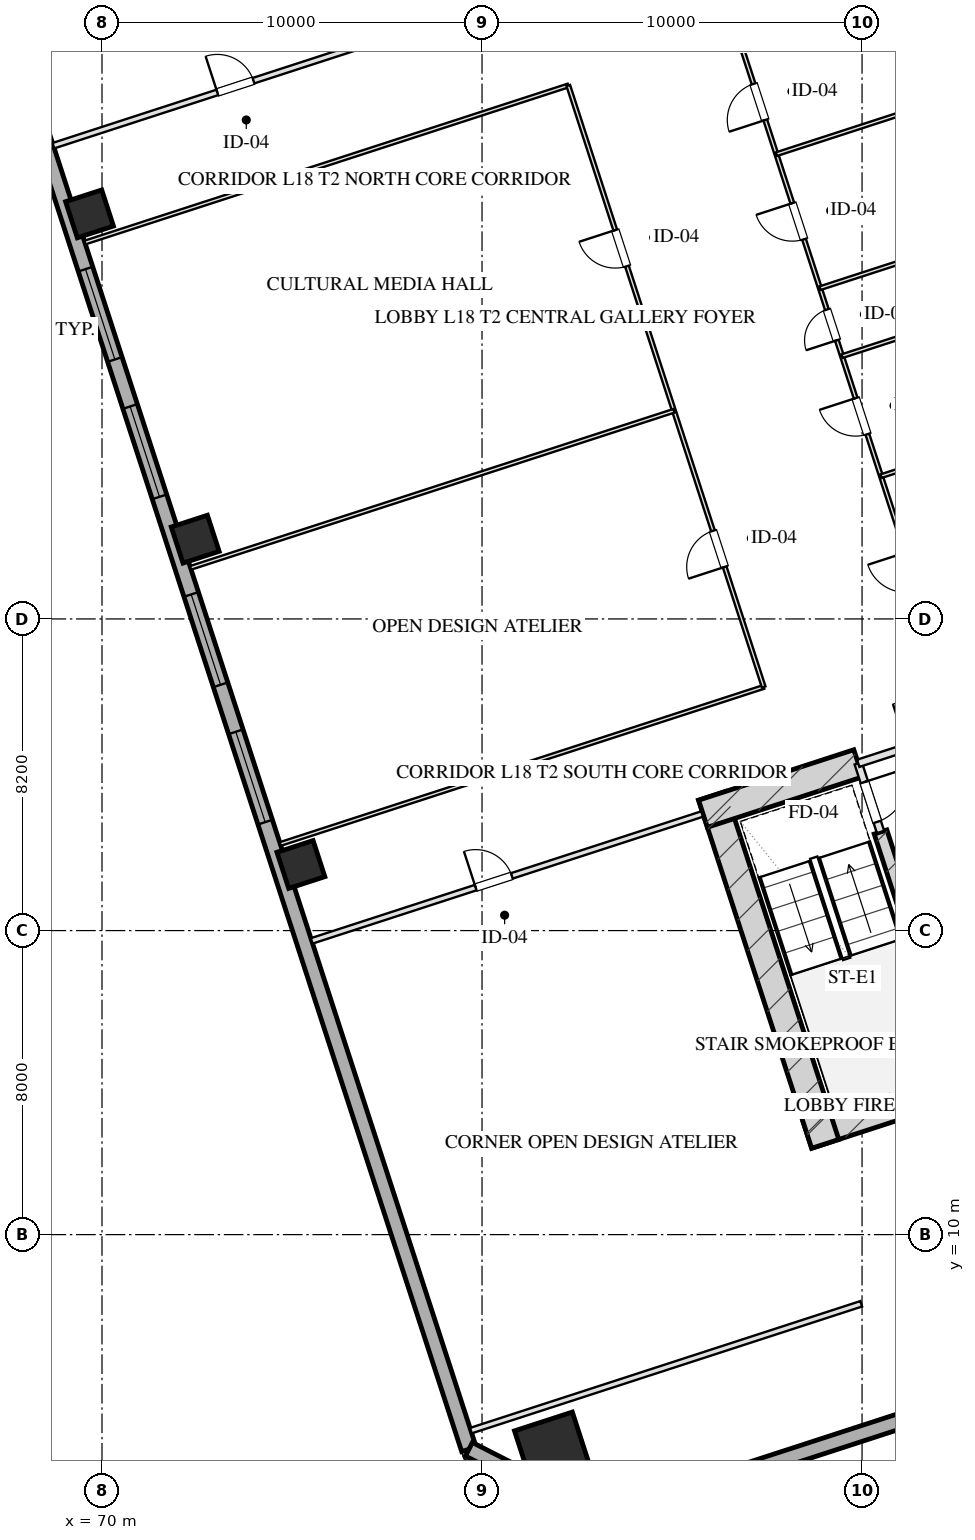
"""IFC4 building model, lengths in metres.
Left out: names, types, materials, properties, quantities, classifications, styles, units other than length and angle.
Written with IfcOpenShell. Run it as: python <this file> out.ifc"""

import sys

from ifc_helpers import new_model, si_unit, direction, frame, frame_2d, origin, origin_2d, place, context, subcontext, project, spatial, rectangle, hollow_rectangle, extrude, element, fill, save


model = new_model("IFC4")
c1 = context("Model", 3, precision=1e-05, world=origin(), true_north=direction((0.0, 1.0)))
c2 = subcontext(c1, "Body", "Model", "MODEL_VIEW")
j1 = project(units=[si_unit("LENGTHUNIT", "METRE"), si_unit("PLANEANGLEUNIT", "RADIAN")], contexts=[c1])
p1 = place(None, origin())
s1 = spatial("IfcSite", under=j1, at=p1, CompositionType="ELEMENT")
p2 = place(p1, origin())
s2 = spatial("IfcBuilding", under=s1, at=p2, CompositionType="ELEMENT")
p3 = place(p2, frame((0.0, 0.0, 74.75)))
s3 = spatial("IfcBuildingStorey", under=s2, at=p3, CompositionType="ELEMENT", Elevation=74.75)
p4 = place(p3, frame((88.559, 12.629, 0.0), z_axis=(0.0, 0.0, 1.0), x_axis=(0.951056072937, 0.309018358888, 0.0)))
e1 = element("IfcWall", 1, at=p4, inside=s3, PredefinedType="SHEAR", context=c2, shape_type="SweptSolid", body=[
    extrude(rectangle(XDim=16.55, YDim=0.75, at=frame_2d((8.275, 0.0))), origin(), (0.0, 0.0, 1.0), 3.45),
])
p5 = place(p3, frame((86.055, 21.546, 0.0), z_axis=(0.0, 0.0, 1.0), x_axis=(0.309023585745, -0.951054374604, 0.0)))
e2 = element("IfcWall", 2, at=p5, inside=s3, PredefinedType="SHEAR", context=c2, shape_type="SweptSolid", body=[
    extrude(rectangle(XDim=9.63, YDim=0.75, at=frame_2d((4.815, 0.0))), origin(), (0.0, 0.0, 1.0), 3.45),
])
p6 = place(p3, frame((90.486, 20.594, 0.0), z_axis=(0.0, 0.0, 1.0), x_axis=(0.309020428229, -0.951055400562, 0.0)))
e3 = element("IfcWall", 3, at=p6, inside=s3, PredefinedType="SHEAR", context=c2, shape_type="SweptSolid", body=[
    extrude(rectangle(XDim=6.98, YDim=0.35, at=frame_2d((3.49, 0.0))), origin(), (0.0, 0.0, 1.0), 3.45),
])
p7 = place(p3, frame((85.814, 21.074, 0.0), z_axis=(0.0, 0.0, 1.0), x_axis=(0.95106580992, 0.308988390074, 0.0)))
e4 = element("IfcWall", 4, at=p7, inside=s3, PredefinedType="SHEAR", context=c2, shape_type="SweptSolid", body=[
    extrude(rectangle(XDim=4.295, YDim=0.75, at=frame_2d((2.147, 0.0))), origin(), (0.0, 0.0, 1.0), 3.45),
])
p8 = place(p3, frame((81.863, 4.323, 0.0), z_axis=(0.0, 0.0, 1.0), x_axis=(0.951056516295, 0.309016994375, 0.0)))
e5 = element("IfcColumn", 5, at=p8, inside=s3, PredefinedType="COLUMN", context=c2, shape_type="SweptSolid", body=[
    extrude(hollow_rectangle(XDim=1.6, YDim=1.6, WallThickness=0.055, at=origin_2d()), origin(), (0.0, 0.0, 1.0), 3.451),
])
for number, where, z_axis, x_axis in (
    (6, (75.234, 19.739, 0.0), (0.0, 0.0, 1.0), (0.951, 0.309, 0.0)),
    (7, (72.453, 28.299, 0.0), (0.0, 0.0, 1.0), (0.951, 0.309, 0.0)),
    (8, (69.672, 36.858, 0.0), (0.0, 0.0, 1.0), (0.951, 0.309, 0.0)),
):
    element("IfcColumn", number, at=place(p3, frame(where, z_axis=z_axis, x_axis=x_axis)), inside=s3, PredefinedType="COLUMN", context=c2, shape_type="SweptSolid", body=[
        extrude(hollow_rectangle(XDim=1.0, YDim=1.0, WallThickness=0.036, at=origin_2d()), origin(), (0.0, 0.0, 1.0), 3.451),
    ])
p9 = place(p3, frame((79.655, 4.352, 0.0), z_axis=(0.0, 0.0, 1.0), x_axis=(-0.309014526607, 0.951057318118, 0.0)))
e9 = element("IfcWall", 9, at=p9, inside=s3, PredefinedType="SOLIDWALL", context=c2, shape_type="SweptSolid", body=[
    extrude(rectangle(XDim=50.0, YDim=0.4, at=frame_2d((25.0, 0.0))), origin(), (0.0, 0.0, 1.0), 2.61),
])
p10 = place(p9, frame((17.35, 0.0, 0.75)))
e10 = element("IfcOpeningElement", 10, at=p10, cuts=e9, PredefinedType="OPENING", context=c2, shape_type="SweptSolid", body=[
    extrude(rectangle(XDim=2.5, YDim=1.46, at=frame_2d((1.25, 0.73))), frame((0.0, 0.21, 0.0), z_axis=(0.0, -1.0, 0.0), x_axis=(1.0, 0.0, 0.0)), (0.0, 0.0, 1.0), 0.42),
])
p11 = place(p9, frame((21.15, 0.0, 0.75)))
e11 = element("IfcOpeningElement", 11, at=p11, cuts=e9, PredefinedType="OPENING", context=c2, shape_type="SweptSolid", body=[
    extrude(rectangle(XDim=2.5, YDim=1.46, at=frame_2d((1.25, 0.73))), frame((0.0, 0.21, 0.0), z_axis=(0.0, -1.0, 0.0), x_axis=(1.0, 0.0, 0.0)), (0.0, 0.0, 1.0), 0.42),
])
p12 = place(p9, frame((26.35, 0.0, 0.75)))
e12 = element("IfcOpeningElement", 12, at=p12, cuts=e9, PredefinedType="OPENING", context=c2, shape_type="SweptSolid", body=[
    extrude(rectangle(XDim=2.5, YDim=1.46, at=frame_2d((1.25, 0.73))), frame((0.0, 0.21, 0.0), z_axis=(0.0, -1.0, 0.0), x_axis=(1.0, 0.0, 0.0)), (0.0, 0.0, 1.0), 0.42),
])
p13 = place(p9, frame((30.15, 0.0, 0.75)))
e13 = element("IfcOpeningElement", 13, at=p13, cuts=e9, PredefinedType="OPENING", context=c2, shape_type="SweptSolid", body=[
    extrude(rectangle(XDim=2.5, YDim=1.46, at=frame_2d((1.25, 0.73))), frame((0.0, 0.21, 0.0), z_axis=(0.0, -1.0, 0.0), x_axis=(1.0, 0.0, 0.0)), (0.0, 0.0, 1.0), 0.42),
])
p14 = place(p3, frame((113.998, 12.567, 0.0), z_axis=(0.0, 0.0, 1.0), x_axis=(-0.951055939317, -0.309018770125, 0.0)))
e14 = element("IfcWall", 14, at=p14, inside=s3, PredefinedType="SOLIDWALL", context=c2, shape_type="SweptSolid", body=[
    extrude(rectangle(XDim=32.4, YDim=0.4, at=frame_2d((16.2, 0.0))), origin(), (0.0, 0.0, 1.0), 2.61),
])
p15 = place(p3, frame((83.184, 2.554, 0.0), z_axis=(0.0, 0.0, 1.0), x_axis=(-0.890998089617, 0.454007053137, 0.0)))
e15 = element("IfcWall", 15, at=p15, inside=s3, PredefinedType="SOLIDWALL", context=c2, shape_type="SweptSolid", body=[
    extrude(rectangle(XDim=3.96, YDim=0.4, at=frame_2d((1.98, 0.0))), origin(), (0.0, 0.0, 1.0), 2.61),
])
p16 = place(p3, frame((89.899, 22.401, 0.0), z_axis=(0.0, 0.0, 1.0), x_axis=(0.308932062672, -0.951084108086, 0.0)))
e16 = element("IfcWall", 16, at=p16, inside=s3, PredefinedType="PARTITIONING", context=c2, shape_type="SweptSolid", body=[
    extrude(rectangle(XDim=1.9, YDim=0.2, at=frame_2d((0.95, 0.0))), origin(), (0.0, 0.0, 1.0), 3.175),
])
p17 = place(p16, frame((0.52, 0.0, 0.0)))
e17 = element("IfcOpeningElement", 17, at=p17, cuts=e16, PredefinedType="OPENING", context=c2, shape_type="SweptSolid", body=[
    extrude(rectangle(XDim=1.1, YDim=2.05, at=frame_2d((0.55, 1.025))), frame((0.0, 0.11, 0.0), z_axis=(0.0, -1.0, 0.0), x_axis=(1.0, 0.0, 0.0)), (0.0, 0.0, 1.0), 0.22),
])
p18 = place(p3, frame((89.899, 22.401, 0.0), z_axis=(0.0, 0.0, 1.0), x_axis=(0.951046716504, 0.309047153403, 0.0)))
e18 = element("IfcWall", 18, at=p18, inside=s3, PredefinedType="PARTITIONING", context=c2, shape_type="SweptSolid", body=[
    extrude(rectangle(XDim=3.83, YDim=0.2, at=frame_2d((1.915, 0.0))), origin(), (0.0, 0.0, 1.0), 3.175),
])
p19 = place(p18, frame((1.35, 0.0, 0.0)))
e19 = element("IfcOpeningElement", 19, at=p19, cuts=e18, PredefinedType="OPENING", context=c2, shape_type="SweptSolid", body=[
    extrude(rectangle(XDim=1.2, YDim=2.05, at=frame_2d((0.6, 1.025))), frame((0.0, 0.11, 0.0), z_axis=(0.0, -1.0, 0.0), x_axis=(1.0, 0.0, 0.0)), (0.0, 0.0, 1.0), 0.22),
])
p20 = place(p3, frame((79.707, 4.842, 0.0), z_axis=(0.0, 0.0, 1.0), x_axis=(0.951056658866, 0.309016555588, 0.0)))
e20 = element("IfcWall", 20, at=p20, inside=s3, PredefinedType="PARTITIONING", context=c2, shape_type="SweptSolid", body=[
    extrude(rectangle(XDim=10.8, YDim=0.15, at=frame_2d((5.4, 0.0))), origin(), (0.0, 0.0, 1.0), 3.175),
])
p21 = place(p3, frame((75.519, 17.729, 0.0), z_axis=(0.0, 0.0, 1.0), x_axis=(0.951056658866, 0.309016555588, 0.0)))
e21 = element("IfcWall", 21, at=p21, inside=s3, PredefinedType="PARTITIONING", context=c2, shape_type="SweptSolid", body=[
    extrude(rectangle(XDim=10.8, YDim=0.15, at=frame_2d((5.4, 0.0))), origin(), (0.0, 0.0, 1.0), 2.15),
])
p22 = place(p21, frame((4.536, 0.0, 0.0)))
e22 = element("IfcOpeningElement", 22, at=p22, cuts=e21, PredefinedType="OPENING", context=c2, shape_type="SweptSolid", body=[
    extrude(rectangle(XDim=1.0, YDim=2.05, at=frame_2d((0.5, 1.025))), frame((0.0, 0.085, 0.0), z_axis=(0.0, -1.0, 0.0), x_axis=(1.0, 0.0, 0.0)), (0.0, 0.0, 1.0), 0.17),
])
p23 = place(p3, frame((68.721, 38.652, 0.0), z_axis=(0.0, 0.0, 1.0), x_axis=(0.951056658866, 0.309016555588, 0.0)))
e23 = element("IfcWall", 23, at=p23, inside=s3, PredefinedType="PARTITIONING", context=c2, shape_type="SweptSolid", body=[
    extrude(rectangle(XDim=10.8, YDim=0.15, at=frame_2d((5.4, 0.0))), origin(), (0.0, 0.0, 1.0), 2.15),
])
p24 = place(p23, frame((4.536, 0.0, 0.0)))
e24 = element("IfcOpeningElement", 24, at=p24, cuts=e23, PredefinedType="OPENING", context=c2, shape_type="SweptSolid", body=[
    extrude(rectangle(XDim=1.0, YDim=2.05, at=frame_2d((0.5, 1.025))), frame((0.0, 0.085, 0.0), z_axis=(0.0, -1.0, 0.0), x_axis=(1.0, 0.0, 0.0)), (0.0, 0.0, 1.0), 0.17),
])
p25 = place(p3, frame((74.691, 20.278, 0.0), z_axis=(0.0, 0.0, 1.0), x_axis=(0.951052712421, 0.309028701251, 0.0)))
e25 = element("IfcWall", 25, at=p25, inside=s3, PredefinedType="MOVABLE", context=c2, shape_type="SweptSolid", body=[
    extrude(rectangle(XDim=13.375, YDim=0.1, at=frame_2d((6.688, 0.0))), origin(), (0.0, 0.0, 1.0), 3.175),
])
p26 = place(p3, frame((69.549, 36.103, 0.0), z_axis=(0.0, 0.0, 1.0), x_axis=(0.951058077006, 0.309012190961, 0.0)))
e26 = element("IfcWall", 26, at=p26, inside=s3, PredefinedType="MOVABLE", context=c2, shape_type="SweptSolid", body=[
    extrude(rectangle(XDim=13.375, YDim=0.1, at=frame_2d((6.688, 0.0))), origin(), (0.0, 0.0, 1.0), 3.175),
])
p27 = place(p3, frame((87.412, 24.411, 0.0), z_axis=(0.0, 0.0, 1.0), x_axis=(-0.309022042254, 0.951054876125, 0.0)))
e27 = element("IfcWall", 27, at=p27, inside=s3, PredefinedType="MOVABLE", context=c2, shape_type="SweptSolid", body=[
    extrude(rectangle(XDim=16.64, YDim=0.1, at=frame_2d((8.32, 0.0))), origin(), (0.0, 0.0, 1.0), 3.175),
])
p28 = place(p27, frame((3.32, 0.0, 0.0)))
e28 = element("IfcOpeningElement", 28, at=p28, cuts=e27, PredefinedType="OPENING", context=c2, shape_type="SweptSolid", body=[
    extrude(rectangle(XDim=1.0, YDim=2.05, at=frame_2d((0.5, 1.025))), frame((0.0, 0.06, 0.0), z_axis=(0.0, -1.0, 0.0), x_axis=(1.0, 0.0, 0.0)), (0.0, 0.0, 1.0), 0.12),
])
p29 = place(p27, frame((11.64, 0.0, 0.0)))
e29 = element("IfcOpeningElement", 29, at=p29, cuts=e27, PredefinedType="OPENING", context=c2, shape_type="SweptSolid", body=[
    extrude(rectangle(XDim=1.0, YDim=2.05, at=frame_2d((0.5, 1.025))), frame((0.0, 0.06, 0.0), z_axis=(0.0, -1.0, 0.0), x_axis=(1.0, 0.0, 0.0)), (0.0, 0.0, 1.0), 0.12),
])
p30 = place(p3, frame((91.834, 25.848, 0.0), z_axis=(0.0, 0.0, 1.0), x_axis=(-0.30901773025, 0.951056277195, 0.0)))
e30 = element("IfcWall", 30, at=p30, inside=s3, PredefinedType="MOVABLE", context=c2, shape_type="SweptSolid", body=[
    extrude(rectangle(XDim=16.64, YDim=0.1, at=frame_2d((8.32, 0.0))), origin(), (0.0, 0.0, 1.0), 3.175),
])
p31 = place(p30, frame((1.16, 0.0, 0.0)))
e31 = element("IfcOpeningElement", 31, at=p31, cuts=e30, PredefinedType="OPENING", context=c2, shape_type="SweptSolid", body=[
    extrude(rectangle(XDim=1.05, YDim=2.05, at=frame_2d((0.525, 1.025))), frame((0.0, 0.06, 0.0), z_axis=(0.0, -1.0, 0.0), x_axis=(1.0, 0.0, 0.0)), (0.0, 0.0, 1.0), 0.12),
])
p32 = place(p30, frame((5.48, 0.0, 0.0)))
e32 = element("IfcOpeningElement", 32, at=p32, cuts=e30, PredefinedType="OPENING", context=c2, shape_type="SweptSolid", body=[
    extrude(rectangle(XDim=1.0, YDim=2.05, at=frame_2d((0.5, 1.025))), frame((0.0, 0.06, 0.0), z_axis=(0.0, -1.0, 0.0), x_axis=(1.0, 0.0, 0.0)), (0.0, 0.0, 1.0), 0.12),
])
p33 = place(p30, frame((8.08, 0.0, 0.0)))
e33 = element("IfcOpeningElement", 33, at=p33, cuts=e30, PredefinedType="OPENING", context=c2, shape_type="SweptSolid", body=[
    extrude(rectangle(XDim=0.85, YDim=2.05, at=frame_2d((0.425, 1.025))), frame((0.0, 0.06, 0.0), z_axis=(0.0, -1.0, 0.0), x_axis=(1.0, 0.0, 0.0)), (0.0, 0.0, 1.0), 0.12),
])
p34 = place(p30, frame((10.874, 0.0, 0.0)))
e34 = element("IfcOpeningElement", 34, at=p34, cuts=e30, PredefinedType="OPENING", context=c2, shape_type="SweptSolid", body=[
    extrude(rectangle(XDim=1.0, YDim=2.05, at=frame_2d((0.5, 1.025))), frame((0.0, 0.06, 0.0), z_axis=(0.0, -1.0, 0.0), x_axis=(1.0, 0.0, 0.0)), (0.0, 0.0, 1.0), 0.12),
])
p35 = place(p30, frame((14.174, 0.0, 0.0)))
e35 = element("IfcOpeningElement", 35, at=p35, cuts=e30, PredefinedType="OPENING", context=c2, shape_type="SweptSolid", body=[
    extrude(rectangle(XDim=1.0, YDim=2.05, at=frame_2d((0.5, 1.025))), frame((0.0, 0.06, 0.0), z_axis=(0.0, -1.0, 0.0), x_axis=(1.0, 0.0, 0.0)), (0.0, 0.0, 1.0), 0.12),
])
p36 = place(p3, frame((72.33, 27.544, 0.0), z_axis=(0.0, 0.0, 1.0), x_axis=(0.951056333968, 0.309017555521, 0.0)))
e36 = element("IfcWall", 36, at=p36, inside=s3, PredefinedType="MOVABLE", context=c2, shape_type="SweptSolid", body=[
    extrude(rectangle(XDim=13.375, YDim=0.1, at=frame_2d((6.688, 0.0))), origin(), (0.0, 0.0, 1.0), 3.175),
])
for number, where, z_axis, x_axis in (
    (37, (90.499, 29.956, 0.0), (0.0, 0.0, 1.0), (0.951, 0.309, 0.0)),
    (38, (89.473, 33.114, 0.0), (0.0, 0.0, 1.0), (0.951, 0.309, 0.0)),
    (39, (88.892, 34.902, 0.0), (0.0, 0.0, 1.0), (0.951, 0.309, 0.0)),
    (40, (87.746, 38.429, 0.0), (0.0, 0.0, 1.0), (0.951, 0.309, 0.0)),
):
    element("IfcWall", number, at=place(p3, frame(where, z_axis=z_axis, x_axis=x_axis)), inside=s3, PredefinedType="MOVABLE", context=c2, shape_type="SweptSolid", body=[
        extrude(rectangle(XDim=19.575, YDim=0.1, at=frame_2d((9.788, 0.0))), origin(), (0.0, 0.0, 1.0), 3.175),
    ])
p37 = place(p10, origin())
e41 = element("IfcWindow", 41, at=p37, inside=s3, PartitioningType="TRIPLE_PANEL_VERTICAL", PredefinedType="WINDOW", context=c2, shape_type="SweptSolid", body=[
    extrude(rectangle(XDim=2.5, YDim=1.46, at=frame_2d((1.25, 0.73))), frame((0.0, 0.03, 0.0), z_axis=(0.0, -1.0, 0.0), x_axis=(1.0, 0.0, 0.0)), (0.0, 0.0, 1.0), 0.06),
])
fill(e10, e41)
p38 = place(p11, origin())
e42 = element("IfcWindow", 42, at=p38, inside=s3, PartitioningType="TRIPLE_PANEL_VERTICAL", PredefinedType="WINDOW", context=c2, shape_type="SweptSolid", body=[
    extrude(rectangle(XDim=2.5, YDim=1.46, at=frame_2d((1.25, 0.73))), frame((0.0, 0.03, 0.0), z_axis=(0.0, -1.0, 0.0), x_axis=(1.0, 0.0, 0.0)), (0.0, 0.0, 1.0), 0.06),
])
fill(e11, e42)
p39 = place(p12, origin())
e43 = element("IfcWindow", 43, at=p39, inside=s3, PartitioningType="TRIPLE_PANEL_VERTICAL", PredefinedType="WINDOW", context=c2, shape_type="SweptSolid", body=[
    extrude(rectangle(XDim=2.5, YDim=1.46, at=frame_2d((1.25, 0.73))), frame((0.0, 0.03, 0.0), z_axis=(0.0, -1.0, 0.0), x_axis=(1.0, 0.0, 0.0)), (0.0, 0.0, 1.0), 0.06),
])
fill(e12, e43)
p40 = place(p13, origin())
e44 = element("IfcWindow", 44, at=p40, inside=s3, PartitioningType="TRIPLE_PANEL_VERTICAL", PredefinedType="WINDOW", context=c2, shape_type="SweptSolid", body=[
    extrude(rectangle(XDim=2.5, YDim=1.46, at=frame_2d((1.25, 0.73))), frame((0.0, 0.03, 0.0), z_axis=(0.0, -1.0, 0.0), x_axis=(1.0, 0.0, 0.0)), (0.0, 0.0, 1.0), 0.06),
])
fill(e13, e44)
p41 = place(p17, origin())
e45 = element("IfcDoor", 45, at=p41, inside=s3, OperationType="SINGLE_SWING_LEFT", PredefinedType="DOOR", context=c2, shape_type="SweptSolid", body=[
    extrude(rectangle(XDim=1.1, YDim=2.05, at=frame_2d((0.55, 1.025))), frame((0.0, 0.025, 0.0), z_axis=(0.0, -1.0, 0.0), x_axis=(1.0, 0.0, 0.0)), (0.0, 0.0, 1.0), 0.05),
])
fill(e17, e45)
p42 = place(p22, origin())
e46 = element("IfcDoor", 46, at=p42, inside=s3, OperationType="SINGLE_SWING_LEFT", PredefinedType="DOOR", context=c2, shape_type="SweptSolid", body=[
    extrude(rectangle(XDim=1.0, YDim=2.05, at=frame_2d((0.5, 1.025))), frame((0.0, 0.025, 0.0), z_axis=(0.0, -1.0, 0.0), x_axis=(1.0, 0.0, 0.0)), (0.0, 0.0, 1.0), 0.05),
])
fill(e22, e46)
p43 = place(p24, origin())
e47 = element("IfcDoor", 47, at=p43, inside=s3, OperationType="SINGLE_SWING_LEFT", PredefinedType="DOOR", context=c2, shape_type="SweptSolid", body=[
    extrude(rectangle(XDim=1.0, YDim=2.05, at=frame_2d((0.5, 1.025))), frame((0.0, 0.025, 0.0), z_axis=(0.0, -1.0, 0.0), x_axis=(1.0, 0.0, 0.0)), (0.0, 0.0, 1.0), 0.05),
])
fill(e24, e47)
p44 = place(p28, origin())
e48 = element("IfcDoor", 48, at=p44, inside=s3, OperationType="SINGLE_SWING_LEFT", PredefinedType="DOOR", context=c2, shape_type="SweptSolid", body=[
    extrude(rectangle(XDim=1.0, YDim=2.05, at=frame_2d((0.5, 1.025))), frame((0.0, 0.025, 0.0), z_axis=(0.0, -1.0, 0.0), x_axis=(1.0, 0.0, 0.0)), (0.0, 0.0, 1.0), 0.05),
])
fill(e28, e48)
p45 = place(p29, origin())
e49 = element("IfcDoor", 49, at=p45, inside=s3, OperationType="SINGLE_SWING_RIGHT", PredefinedType="DOOR", context=c2, shape_type="SweptSolid", body=[
    extrude(rectangle(XDim=1.0, YDim=2.05, at=frame_2d((0.5, 1.025))), frame((0.0, 0.025, 0.0), z_axis=(0.0, -1.0, 0.0), x_axis=(1.0, 0.0, 0.0)), (0.0, 0.0, 1.0), 0.05),
])
fill(e29, e49)
p46 = place(p32, origin())
e50 = element("IfcDoor", 50, at=p46, inside=s3, OperationType="SINGLE_SWING_RIGHT", PredefinedType="DOOR", context=c2, shape_type="SweptSolid", body=[
    extrude(rectangle(XDim=1.0, YDim=2.05, at=frame_2d((0.5, 1.025))), frame((0.0, 0.025, 0.0), z_axis=(0.0, -1.0, 0.0), x_axis=(1.0, 0.0, 0.0)), (0.0, 0.0, 1.0), 0.05),
])
fill(e32, e50)
p47 = place(p33, origin())
e51 = element("IfcDoor", 51, at=p47, inside=s3, OperationType="SINGLE_SWING_LEFT", PredefinedType="DOOR", context=c2, shape_type="SweptSolid", body=[
    extrude(rectangle(XDim=0.85, YDim=2.05, at=frame_2d((0.425, 1.025))), frame((0.0, 0.025, 0.0), z_axis=(0.0, -1.0, 0.0), x_axis=(1.0, 0.0, 0.0)), (0.0, 0.0, 1.0), 0.05),
])
fill(e33, e51)
p48 = place(p34, origin())
e52 = element("IfcDoor", 52, at=p48, inside=s3, OperationType="SINGLE_SWING_RIGHT", PredefinedType="DOOR", context=c2, shape_type="SweptSolid", body=[
    extrude(rectangle(XDim=1.0, YDim=2.05, at=frame_2d((0.5, 1.025))), frame((0.0, 0.025, 0.0), z_axis=(0.0, -1.0, 0.0), x_axis=(1.0, 0.0, 0.0)), (0.0, 0.0, 1.0), 0.05),
])
fill(e34, e52)
p49 = place(p35, origin())
e53 = element("IfcDoor", 53, at=p49, inside=s3, OperationType="SINGLE_SWING_LEFT", PredefinedType="DOOR", context=c2, shape_type="SweptSolid", body=[
    extrude(rectangle(XDim=1.0, YDim=2.05, at=frame_2d((0.5, 1.025))), frame((0.0, 0.025, 0.0), z_axis=(0.0, -1.0, 0.0), x_axis=(1.0, 0.0, 0.0)), (0.0, 0.0, 1.0), 0.05),
])
fill(e35, e53)
save(model, sys.argv[1])
